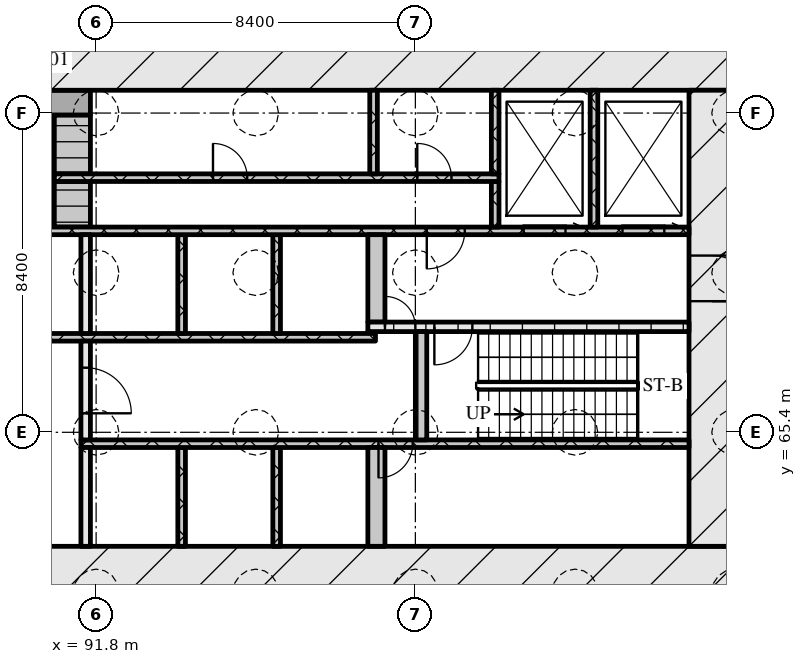
"""IFC4 building model, lengths in metres.
Left out: names, types, materials, properties, quantities, classifications, styles, units other than length and angle.
Written with IfcOpenShell. Run it as: python <this file> out.ifc"""

import sys

from ifc_helpers import new_model, si_unit, direction, frame, frame_2d, origin, place, context, subcontext, project, spatial, rectangle, extrude, element, fill, save


model = new_model("IFC4")
c1 = context("Model", 3, precision=1e-05, world=origin(), true_north=direction((0.0, 1.0)))
c2 = subcontext(c1, "Body", "Model", "MODEL_VIEW")
j1 = project(units=[si_unit("LENGTHUNIT", "METRE"), si_unit("PLANEANGLEUNIT", "RADIAN")], contexts=[c1])
p1 = place(None, origin())
s1 = spatial("IfcSite", under=j1, at=p1, CompositionType="ELEMENT")
p2 = place(p1, origin())
s2 = spatial("IfcBuilding", under=s1, at=p2, CompositionType="ELEMENT")
p3 = place(p2, frame((0.0, 0.0, -6.0)))
s3 = spatial("IfcBuildingStorey", under=s2, at=p3, CompositionType="ELEMENT", Elevation=-6.0)
p4 = place(p3, frame((66.6, 61.8, 0.0), z_axis=(0.0, 0.0, 1.0), x_axis=(1.0, 0.0, 0.0)))
e1 = element("IfcWall", 1, at=p4, inside=s3, PredefinedType="SOLIDWALL", context=c2, shape_type="SweptSolid", body=[
    extrude(rectangle(XDim=42.0, YDim=1.2, at=frame_2d((21.0, 0.0))), origin(), (0.0, 0.0, 1.0), 5.7),
])
p5 = place(p4, frame((21.35, 0.0, 0.0)))
e2 = element("IfcOpeningElement", 2, at=p5, cuts=e1, PredefinedType="OPENING", context=c2, shape_type="SweptSolid", body=[
    extrude(rectangle(XDim=1.8, YDim=2.1, at=frame_2d((0.9, 1.05))), frame((0.0, 0.61, 0.0), z_axis=(0.0, -1.0, 0.0), x_axis=(1.0, 0.0, 0.0)), (0.0, 0.0, 1.0), 1.22),
])
p6 = place(p3, frame((66.6, 75.0, 0.0), z_axis=(0.0, 0.0, 1.0), x_axis=(1.0, 0.0, 0.0)))
e3 = element("IfcWall", 3, at=p6, inside=s3, PredefinedType="SOLIDWALL", context=c2, shape_type="SweptSolid", body=[
    extrude(rectangle(XDim=42.0, YDim=1.2, at=frame_2d((21.0, 0.0))), origin(), (0.0, 0.0, 1.0), 5.7),
])
p7 = place(p3, frame((108.0, 62.4, 0.0), z_axis=(0.0, 0.0, 1.0), x_axis=(0.0, 1.0, 0.0)))
e4 = element("IfcWall", 4, at=p7, inside=s3, PredefinedType="SOLIDWALL", context=c2, shape_type="SweptSolid", body=[
    extrude(rectangle(XDim=12.0, YDim=1.2, at=frame_2d((6.0, 0.0))), origin(), (0.0, 0.0, 1.0), 5.7),
])
p8 = place(p7, frame((6.45, 0.0, 0.0)))
e5 = element("IfcOpeningElement", 5, at=p8, cuts=e4, PredefinedType="OPENING", context=c2, shape_type="SweptSolid", body=[
    extrude(rectangle(XDim=1.2, YDim=2.1, at=frame_2d((0.6, 1.05))), frame((0.0, 0.61, 0.0), z_axis=(0.0, -1.0, 0.0), x_axis=(1.0, 0.0, 0.0)), (0.0, 0.0, 1.0), 1.22),
])
p9 = place(p3, frame((91.525, 62.4, 0.0), z_axis=(0.0, 0.0, 1.0), x_axis=(0.0, 1.0, 0.0)))
e6 = element("IfcWall", 6, at=p9, inside=s3, PredefinedType="SOLIDWALL", context=c2, shape_type="SweptSolid", body=[
    extrude(rectangle(XDim=2.6, YDim=0.25, at=frame_2d((1.3, 0.0))), origin(), (0.0, 0.0, 1.0), 5.7),
])
for number, where, z_axis, x_axis in (
    (7, (94.05, 62.4, 0.0), (0.0, 0.0, 1.0), (0.0, 1.0, 0.0)),
    (8, (96.55, 62.4, 0.0), (0.0, 0.0, 1.0), (0.0, 1.0, 0.0)),
):
    element("IfcWall", number, at=place(p3, frame(where, z_axis=z_axis, x_axis=x_axis)), inside=s3, PredefinedType="SOLIDWALL", context=c2, shape_type="SweptSolid", body=[
        extrude(rectangle(XDim=2.6, YDim=0.2, at=frame_2d((1.3, 0.0))), origin(), (0.0, 0.0, 1.0), 5.7),
    ])
p10 = place(p3, frame((99.175, 62.4, 0.0), z_axis=(0.0, 0.0, 1.0), x_axis=(0.0, 1.0, 0.0)))
e9 = element("IfcWall", 9, at=p10, inside=s3, PredefinedType="SOLIDWALL", context=c2, shape_type="SweptSolid", body=[
    extrude(rectangle(XDim=2.6, YDim=0.45, at=frame_2d((1.3, 0.0))), origin(), (0.0, 0.0, 1.0), 5.7),
])
p11 = place(p3, frame((91.4, 65.1, 0.0), z_axis=(0.0, 0.0, 1.0), x_axis=(1.0, 0.0, 0.0)))
e10 = element("IfcWall", 10, at=p11, inside=s3, PredefinedType="SOLIDWALL", context=c2, shape_type="SweptSolid", body=[
    extrude(rectangle(XDim=16.0, YDim=0.2, at=frame_2d((8.0, 0.0))), origin(), (0.0, 0.0, 1.0), 5.7),
])
p12 = place(p11, frame((7.83, 0.0, 0.0)))
e11 = element("IfcOpeningElement", 11, at=p12, cuts=e10, PredefinedType="OPENING", context=c2, shape_type="SweptSolid", body=[
    extrude(rectangle(XDim=0.9, YDim=2.1, at=frame_2d((0.45, 1.05))), frame((0.0, 0.11, 0.0), z_axis=(0.0, -1.0, 0.0), x_axis=(1.0, 0.0, 0.0)), (0.0, 0.0, 1.0), 0.22),
])
p13 = place(p3, frame((91.525, 65.2, 0.0), z_axis=(0.0, 0.0, 1.0), x_axis=(0.0, 1.0, 0.0)))
e12 = element("IfcWall", 12, at=p13, inside=s3, PredefinedType="SOLIDWALL", context=c2, shape_type="SweptSolid", body=[
    extrude(rectangle(XDim=2.6, YDim=0.25, at=frame_2d((1.3, 0.0))), origin(), (0.0, 0.0, 1.0), 5.7),
])
p14 = place(p13, frame((0.7, 0.0, 0.0)))
e13 = element("IfcOpeningElement", 13, at=p14, cuts=e12, PredefinedType="OPENING", context=c2, shape_type="SweptSolid", body=[
    extrude(rectangle(XDim=1.2, YDim=2.1, at=frame_2d((0.6, 1.05))), frame((0.0, 0.135, 0.0), z_axis=(0.0, -1.0, 0.0), x_axis=(1.0, 0.0, 0.0)), (0.0, 0.0, 1.0), 0.27),
])
p15 = place(p3, frame((100.35, 65.2, 0.0), z_axis=(0.0, 0.0, 1.0), x_axis=(0.0, 1.0, 0.0)))
e14 = element("IfcWall", 14, at=p15, inside=s3, PredefinedType="SOLIDWALL", context=c2, shape_type="SweptSolid", body=[
    extrude(rectangle(XDim=2.85, YDim=0.3, at=frame_2d((1.425, 0.0))), origin(), (0.0, 0.0, 1.0), 5.7),
])
p16 = place(p3, frame((76.05, 67.9, 0.0), z_axis=(0.0, 0.0, 1.0), x_axis=(1.0, 0.0, 0.0)))
e15 = element("IfcWall", 15, at=p16, inside=s3, PredefinedType="SOLIDWALL", context=c2, shape_type="SweptSolid", body=[
    extrude(rectangle(XDim=23.1, YDim=0.2, at=frame_2d((11.55, 0.0))), origin(), (0.0, 0.0, 1.0), 5.7),
])
p17 = place(p16, frame((13.55, 0.0, 0.0)))
e16 = element("IfcOpeningElement", 16, at=p17, cuts=e15, PredefinedType="OPENING", context=c2, shape_type="SweptSolid", body=[
    extrude(rectangle(XDim=1.0, YDim=2.1, at=frame_2d((0.5, 1.05))), frame((0.0, 0.11, 0.0), z_axis=(0.0, -1.0, 0.0), x_axis=(1.0, 0.0, 0.0)), (0.0, 0.0, 1.0), 0.22),
])
p18 = place(p3, frame((91.525, 68.0, 0.0), z_axis=(0.0, 0.0, 1.0), x_axis=(0.0, 1.0, 0.0)))
e17 = element("IfcWall", 17, at=p18, inside=s3, PredefinedType="SOLIDWALL", context=c2, shape_type="SweptSolid", body=[
    extrude(rectangle(XDim=2.6, YDim=0.25, at=frame_2d((1.3, 0.0))), origin(), (0.0, 0.0, 1.0), 5.7),
])
for number, where, z_axis, x_axis in (
    (18, (94.05, 68.0, 0.0), (0.0, 0.0, 1.0), (0.0, 1.0, 0.0)),
    (19, (96.55, 68.0, 0.0), (0.0, 0.0, 1.0), (0.0, 1.0, 0.0)),
):
    element("IfcWall", number, at=place(p3, frame(where, z_axis=z_axis, x_axis=x_axis)), inside=s3, PredefinedType="SOLIDWALL", context=c2, shape_type="SweptSolid", body=[
        extrude(rectangle(XDim=2.6, YDim=0.2, at=frame_2d((1.3, 0.0))), origin(), (0.0, 0.0, 1.0), 5.7),
    ])
p19 = place(p3, frame((98.95, 68.025, 0.0), z_axis=(0.0, 0.0, 1.0), x_axis=(1.0, 0.0, 0.0)))
e20 = element("IfcWall", 20, at=p19, inside=s3, PredefinedType="SOLIDWALL", context=c2, shape_type="SweptSolid", body=[
    extrude(rectangle(XDim=0.2, YDim=0.05, at=frame_2d((0.1, 0.0))), origin(), (0.0, 0.0, 1.0), 5.7),
])
p20 = place(p3, frame((98.95, 68.175, 0.0), z_axis=(0.0, 0.0, 1.0), x_axis=(1.0, 0.0, 0.0)))
e21 = element("IfcWall", 21, at=p20, inside=s3, PredefinedType="SOLIDWALL", context=c2, shape_type="SweptSolid", body=[
    extrude(rectangle(XDim=8.45, YDim=0.25, at=frame_2d((4.225, 0.0))), origin(), (0.0, 0.0, 1.0), 5.7),
])
p21 = place(p20, frame((0.45, 0.0, 0.0)))
e22 = element("IfcOpeningElement", 22, at=p21, cuts=e21, PredefinedType="OPENING", context=c2, shape_type="SweptSolid", body=[
    extrude(rectangle(XDim=0.8, YDim=2.1, at=frame_2d((0.4, 1.05))), frame((0.0, 0.135, 0.0), z_axis=(0.0, -1.0, 0.0), x_axis=(1.0, 0.0, 0.0)), (0.0, 0.0, 1.0), 0.27),
])
p22 = place(p20, frame((1.75, 0.0, 0.0)))
e23 = element("IfcOpeningElement", 23, at=p22, cuts=e21, PredefinedType="OPENING", context=c2, shape_type="SweptSolid", body=[
    extrude(rectangle(XDim=1.0, YDim=2.1, at=frame_2d((0.5, 1.05))), frame((0.0, 0.135, 0.0), z_axis=(0.0, -1.0, 0.0), x_axis=(1.0, 0.0, 0.0)), (0.0, 0.0, 1.0), 0.27),
])
p23 = place(p3, frame((99.175, 68.3, 0.0), z_axis=(0.0, 0.0, 1.0), x_axis=(0.0, 1.0, 0.0)))
e24 = element("IfcWall", 24, at=p23, inside=s3, PredefinedType="SOLIDWALL", context=c2, shape_type="SweptSolid", body=[
    extrude(rectangle(XDim=2.3, YDim=0.45, at=frame_2d((1.15, 0.0))), origin(), (0.0, 0.0, 1.0), 5.7),
])
p24 = place(p3, frame((67.8, 70.7, 0.0), z_axis=(0.0, 0.0, 1.0), x_axis=(1.0, 0.0, 0.0)))
e25 = element("IfcWall", 25, at=p24, inside=s3, PredefinedType="SOLIDWALL", context=c2, shape_type="SweptSolid", body=[
    extrude(rectangle(XDim=39.6, YDim=0.2, at=frame_2d((19.8, 0.0))), origin(), (0.0, 0.0, 1.0), 5.7),
])
p25 = place(p24, frame((0.65, 0.0, 0.0)))
e26 = element("IfcOpeningElement", 26, at=p25, cuts=e25, PredefinedType="OPENING", context=c2, shape_type="SweptSolid", body=[
    extrude(rectangle(XDim=1.1, YDim=2.1, at=frame_2d((0.55, 1.05))), frame((0.0, 0.11, 0.0), z_axis=(0.0, -1.0, 0.0), x_axis=(1.0, 0.0, 0.0)), (0.0, 0.0, 1.0), 0.22),
])
p26 = place(p24, frame((3.25, 0.0, 0.0)))
e27 = element("IfcOpeningElement", 27, at=p26, cuts=e25, PredefinedType="OPENING", context=c2, shape_type="SweptSolid", body=[
    extrude(rectangle(XDim=1.1, YDim=2.1, at=frame_2d((0.55, 1.05))), frame((0.0, 0.11, 0.0), z_axis=(0.0, -1.0, 0.0), x_axis=(1.0, 0.0, 0.0)), (0.0, 0.0, 1.0), 0.22),
])
p27 = place(p24, frame((5.9, 0.0, 0.0)))
e28 = element("IfcOpeningElement", 28, at=p27, cuts=e25, PredefinedType="OPENING", context=c2, shape_type="SweptSolid", body=[
    extrude(rectangle(XDim=1.0, YDim=2.1, at=frame_2d((0.5, 1.05))), frame((0.0, 0.11, 0.0), z_axis=(0.0, -1.0, 0.0), x_axis=(1.0, 0.0, 0.0)), (0.0, 0.0, 1.0), 0.22),
])
p28 = place(p24, frame((21.7, 0.0, 0.0)))
e29 = element("IfcOpeningElement", 29, at=p28, cuts=e25, PredefinedType="OPENING", context=c2, shape_type="SweptSolid", body=[
    extrude(rectangle(XDim=1.0, YDim=2.1, at=frame_2d((0.5, 1.05))), frame((0.0, 0.11, 0.0), z_axis=(0.0, -1.0, 0.0), x_axis=(1.0, 0.0, 0.0)), (0.0, 0.0, 1.0), 0.22),
])
p29 = place(p24, frame((32.7, 0.0, 0.0)))
e30 = element("IfcOpeningElement", 30, at=p29, cuts=e25, PredefinedType="OPENING", context=c2, shape_type="SweptSolid", body=[
    extrude(rectangle(XDim=1.0, YDim=2.1, at=frame_2d((0.5, 1.05))), frame((0.0, 0.11, 0.0), z_axis=(0.0, -1.0, 0.0), x_axis=(1.0, 0.0, 0.0)), (0.0, 0.0, 1.0), 0.22),
])
p30 = place(p24, frame((35.25, 0.0, 0.0)))
e31 = element("IfcOpeningElement", 31, at=p30, cuts=e25, PredefinedType="OPENING", context=c2, shape_type="SweptSolid", body=[
    extrude(rectangle(XDim=1.1, YDim=2.1, at=frame_2d((0.55, 1.05))), frame((0.0, 0.11, 0.0), z_axis=(0.0, -1.0, 0.0), x_axis=(1.0, 0.0, 0.0)), (0.0, 0.0, 1.0), 0.22),
])
p31 = place(p24, frame((37.85, 0.0, 0.0)))
e32 = element("IfcOpeningElement", 32, at=p31, cuts=e25, PredefinedType="OPENING", context=c2, shape_type="SweptSolid", body=[
    extrude(rectangle(XDim=1.1, YDim=2.1, at=frame_2d((0.55, 1.05))), frame((0.0, 0.11, 0.0), z_axis=(0.0, -1.0, 0.0), x_axis=(1.0, 0.0, 0.0)), (0.0, 0.0, 1.0), 0.22),
])
p32 = place(p3, frame((91.175, 70.8, 0.0), z_axis=(0.0, 0.0, 1.0), x_axis=(0.0, 1.0, 0.0)))
e33 = element("IfcWall", 33, at=p32, inside=s3, PredefinedType="SOLIDWALL", context=c2, shape_type="SweptSolid", body=[
    extrude(rectangle(XDim=1.2, YDim=0.95, at=frame_2d((0.6, 0.0))), origin(), (0.0, 0.0, 1.0), 5.7),
])
p33 = place(p3, frame((102.3, 70.8, 0.0), z_axis=(0.0, 0.0, 1.0), x_axis=(0.0, 1.0, 0.0)))
e34 = element("IfcWall", 34, at=p33, inside=s3, PredefinedType="SOLIDWALL", context=c2, shape_type="SweptSolid", body=[
    extrude(rectangle(XDim=1.2, YDim=0.2, at=frame_2d((0.6, 0.0))), origin(), (0.0, 0.0, 1.0), 5.7),
])
p34 = place(p3, frame((104.9, 70.8, 0.0), z_axis=(0.0, 0.0, 1.0), x_axis=(0.0, 1.0, 0.0)))
e35 = element("IfcWall", 35, at=p34, inside=s3, PredefinedType="SOLIDWALL", context=c2, shape_type="SweptSolid", body=[
    extrude(rectangle(XDim=3.6, YDim=0.2, at=frame_2d((1.8, 0.0))), origin(), (0.0, 0.0, 1.0), 5.7),
])
p35 = place(p3, frame((90.7, 72.1, 0.0), z_axis=(0.0, 0.0, 1.0), x_axis=(1.0, 0.0, 0.0)))
e36 = element("IfcWall", 36, at=p35, inside=s3, PredefinedType="SOLIDWALL", context=c2, shape_type="SweptSolid", body=[
    extrude(rectangle(XDim=11.7, YDim=0.2, at=frame_2d((5.85, 0.0))), origin(), (0.0, 0.0, 1.0), 5.7),
])
p36 = place(p35, frame((4.175, 0.0, 0.0)))
e37 = element("IfcOpeningElement", 37, at=p36, cuts=e36, PredefinedType="OPENING", context=c2, shape_type="SweptSolid", body=[
    extrude(rectangle(XDim=0.9, YDim=2.1, at=frame_2d((0.45, 1.05))), frame((0.0, 0.11, 0.0), z_axis=(0.0, -1.0, 0.0), x_axis=(1.0, 0.0, 0.0)), (0.0, 0.0, 1.0), 0.22),
])
p37 = place(p35, frame((9.55, 0.0, 0.0)))
e38 = element("IfcOpeningElement", 38, at=p37, cuts=e36, PredefinedType="OPENING", context=c2, shape_type="SweptSolid", body=[
    extrude(rectangle(XDim=0.9, YDim=2.1, at=frame_2d((0.45, 1.05))), frame((0.0, 0.11, 0.0), z_axis=(0.0, -1.0, 0.0), x_axis=(1.0, 0.0, 0.0)), (0.0, 0.0, 1.0), 0.22),
])
p38 = place(p3, frame((91.175, 72.2, 0.0), z_axis=(0.0, 0.0, 1.0), x_axis=(0.0, 1.0, 0.0)))
e39 = element("IfcWall", 39, at=p38, inside=s3, PredefinedType="SOLIDWALL", context=c2, shape_type="SweptSolid", body=[
    extrude(rectangle(XDim=1.55, YDim=0.95, at=frame_2d((0.775, 0.0))), origin(), (0.0, 0.0, 1.0), 5.7),
])
for number, where, z_axis, x_axis in (
    (40, (99.1, 72.2, 0.0), (0.0, 0.0, 1.0), (0.0, 1.0, 0.0)),
    (41, (102.3, 72.2, 0.0), (0.0, 0.0, 1.0), (0.0, 1.0, 0.0)),
):
    element("IfcWall", number, at=place(p3, frame(where, z_axis=z_axis, x_axis=x_axis)), inside=s3, PredefinedType="SOLIDWALL", context=c2, shape_type="SweptSolid", body=[
        extrude(rectangle(XDim=2.2, YDim=0.2, at=frame_2d((1.1, 0.0))), origin(), (0.0, 0.0, 1.0), 5.7),
    ])
p39 = place(p3, frame((83.55, 74.075, 0.0), z_axis=(0.0, 0.0, 1.0), x_axis=(1.0, 0.0, 0.0)))
e42 = element("IfcWall", 42, at=p39, inside=s3, PredefinedType="SOLIDWALL", context=c2, shape_type="SweptSolid", body=[
    extrude(rectangle(XDim=8.1, YDim=0.65, at=frame_2d((4.05, 0.0))), origin(), (0.0, 0.0, 1.0), 5.7),
])
p40 = place(p12, origin())
e43 = element("IfcDoor", 43, at=p40, inside=s3, OperationType="SINGLE_SWING_RIGHT", PredefinedType="DOOR", context=c2, shape_type="SweptSolid", body=[
    extrude(rectangle(XDim=0.9, YDim=2.1, at=frame_2d((0.45, 1.05))), frame((0.0, 0.025, 0.0), z_axis=(0.0, -1.0, 0.0), x_axis=(1.0, 0.0, 0.0)), (0.0, 0.0, 1.0), 0.05),
])
fill(e11, e43)
p41 = place(p14, origin())
e44 = element("IfcDoor", 44, at=p41, inside=s3, OperationType="SINGLE_SWING_RIGHT", PredefinedType="DOOR", context=c2, shape_type="SweptSolid", body=[
    extrude(rectangle(XDim=1.2, YDim=2.1, at=frame_2d((0.6, 1.05))), frame((0.0, 0.025, 0.0), z_axis=(0.0, -1.0, 0.0), x_axis=(1.0, 0.0, 0.0)), (0.0, 0.0, 1.0), 0.05),
])
fill(e13, e44)
p42 = place(p21, origin())
e45 = element("IfcDoor", 45, at=p42, inside=s3, OperationType="SINGLE_SWING_LEFT", PredefinedType="DOOR", context=c2, shape_type="SweptSolid", body=[
    extrude(rectangle(XDim=0.8, YDim=2.1, at=frame_2d((0.4, 1.05))), frame((0.0, 0.025, 0.0), z_axis=(0.0, -1.0, 0.0), x_axis=(1.0, 0.0, 0.0)), (0.0, 0.0, 1.0), 0.05),
])
fill(e22, e45)
p43 = place(p22, origin())
e46 = element("IfcDoor", 46, at=p43, inside=s3, OperationType="SINGLE_SWING_RIGHT", PredefinedType="DOOR", context=c2, shape_type="SweptSolid", body=[
    extrude(rectangle(XDim=1.0, YDim=2.1, at=frame_2d((0.5, 1.05))), frame((0.0, 0.025, 0.0), z_axis=(0.0, -1.0, 0.0), x_axis=(1.0, 0.0, 0.0)), (0.0, 0.0, 1.0), 0.05),
])
fill(e23, e46)
p44 = place(p8, origin())
e47 = element("IfcDoor", 47, at=p44, inside=s3, OperationType="SINGLE_SWING_RIGHT", PredefinedType="DOOR", context=c2, shape_type="SweptSolid", body=[
    extrude(rectangle(XDim=1.2, YDim=2.1, at=frame_2d((0.6, 1.05))), frame((0.0, 0.025, 0.0), z_axis=(0.0, -1.0, 0.0), x_axis=(1.0, 0.0, 0.0)), (0.0, 0.0, 1.0), 0.05),
])
fill(e5, e47)
p45 = place(p29, origin())
e48 = element("IfcDoor", 48, at=p45, inside=s3, OperationType="SINGLE_SWING_RIGHT", PredefinedType="DOOR", context=c2, shape_type="SweptSolid", body=[
    extrude(rectangle(XDim=1.0, YDim=2.1, at=frame_2d((0.5, 1.05))), frame((0.0, 0.025, 0.0), z_axis=(0.0, -1.0, 0.0), x_axis=(1.0, 0.0, 0.0)), (0.0, 0.0, 1.0), 0.05),
])
fill(e30, e48)
p46 = place(p30, origin())
e49 = element("IfcDoor", 49, at=p46, inside=s3, OperationType="SLIDING_TO_RIGHT", PredefinedType="DOOR", context=c2, shape_type="SweptSolid", body=[
    extrude(rectangle(XDim=1.1, YDim=2.1, at=frame_2d((0.55, 1.05))), frame((0.0, 0.025, 0.0), z_axis=(0.0, -1.0, 0.0), x_axis=(1.0, 0.0, 0.0)), (0.0, 0.0, 1.0), 0.05),
])
fill(e31, e49)
p47 = place(p31, origin())
e50 = element("IfcDoor", 50, at=p47, inside=s3, OperationType="SLIDING_TO_RIGHT", PredefinedType="DOOR", context=c2, shape_type="SweptSolid", body=[
    extrude(rectangle(XDim=1.1, YDim=2.1, at=frame_2d((0.55, 1.05))), frame((0.0, 0.025, 0.0), z_axis=(0.0, -1.0, 0.0), x_axis=(1.0, 0.0, 0.0)), (0.0, 0.0, 1.0), 0.05),
])
fill(e32, e50)
p48 = place(p36, origin())
e51 = element("IfcDoor", 51, at=p48, inside=s3, OperationType="SINGLE_SWING_LEFT", PredefinedType="DOOR", context=c2, shape_type="SweptSolid", body=[
    extrude(rectangle(XDim=0.9, YDim=2.1, at=frame_2d((0.45, 1.05))), frame((0.0, 0.025, 0.0), z_axis=(0.0, -1.0, 0.0), x_axis=(1.0, 0.0, 0.0)), (0.0, 0.0, 1.0), 0.05),
])
fill(e37, e51)
p49 = place(p37, origin())
e52 = element("IfcDoor", 52, at=p49, inside=s3, OperationType="SINGLE_SWING_LEFT", PredefinedType="DOOR", context=c2, shape_type="SweptSolid", body=[
    extrude(rectangle(XDim=0.9, YDim=2.1, at=frame_2d((0.45, 1.05))), frame((0.0, 0.025, 0.0), z_axis=(0.0, -1.0, 0.0), x_axis=(1.0, 0.0, 0.0)), (0.0, 0.0, 1.0), 0.05),
])
fill(e38, e52)
save(model, sys.argv[1])
